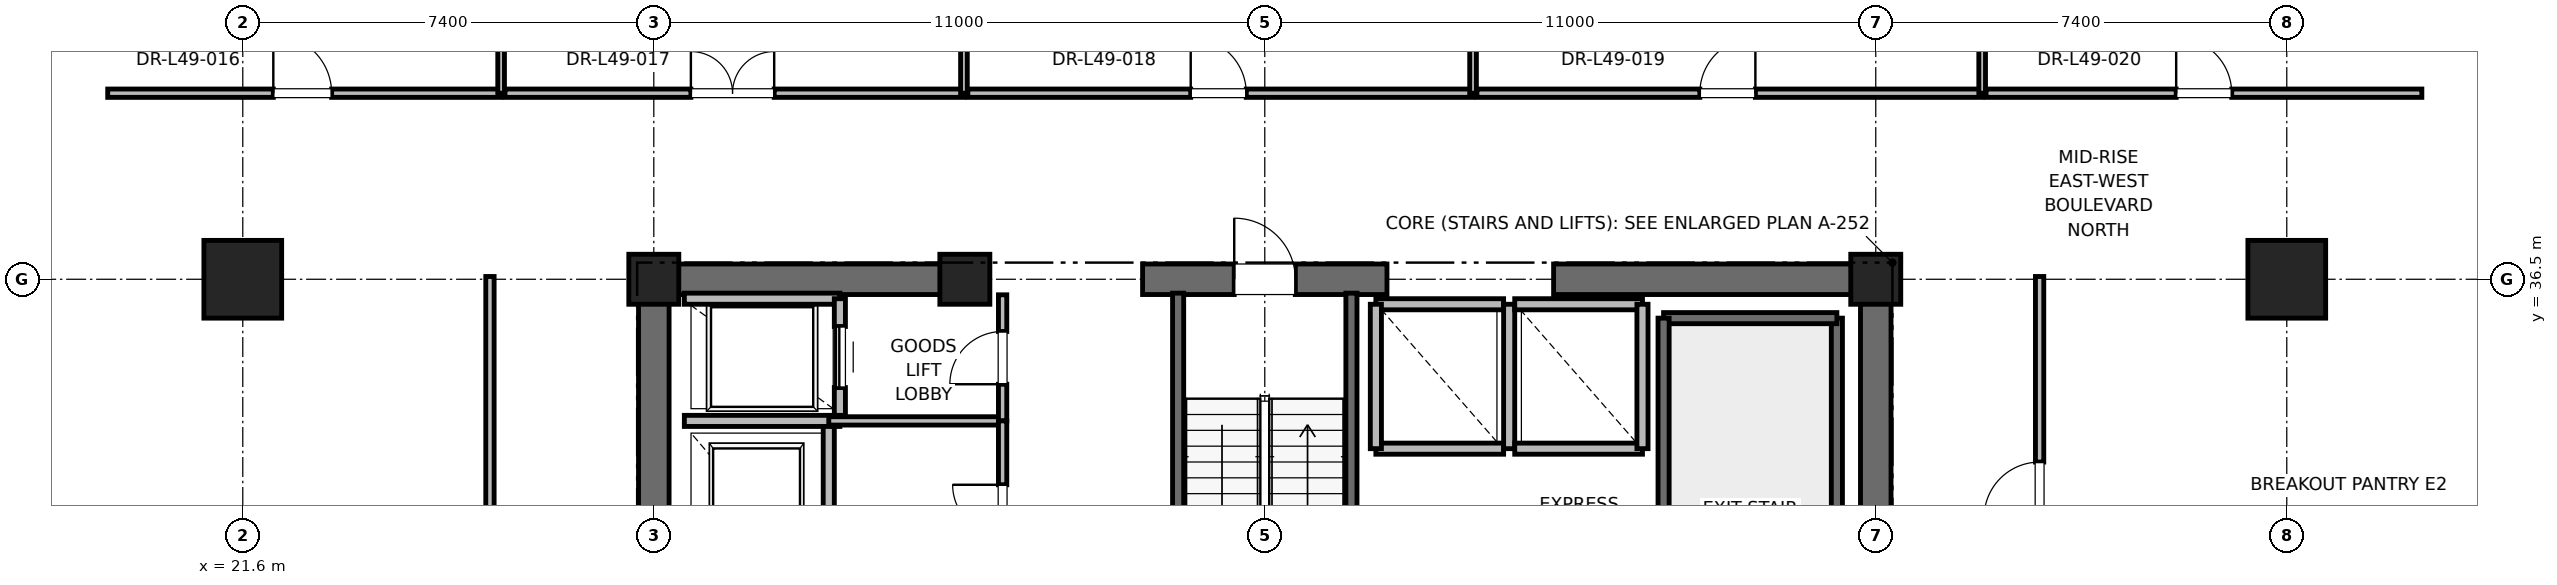
"""IFC4 building model, lengths in metres.
Left out: names, types, materials, properties, quantities, classifications, styles, units other than length and angle.
Written with IfcOpenShell. Run it as: python <this file> out.ifc"""

import sys

from ifc_helpers import new_model, si_unit, direction, frame, frame_2d, origin, origin_2d, place, context, subcontext, project, spatial, rectangle, extrude, element, fill, save


model = new_model("IFC4")
c1 = context("Model", 3, precision=1e-05, world=origin(), true_north=direction((0.0, 1.0)))
c2 = subcontext(c1, "Body", "Model", "MODEL_VIEW")
j1 = project(units=[si_unit("LENGTHUNIT", "METRE"), si_unit("PLANEANGLEUNIT", "RADIAN")], contexts=[c1])
p1 = place(None, origin())
s1 = spatial("IfcSite", under=j1, at=p1, CompositionType="ELEMENT")
p2 = place(p1, origin())
s2 = spatial("IfcBuilding", under=s1, at=p2, CompositionType="ELEMENT")
p3 = place(p2, frame((0.0, 0.0, 213.2)))
s3 = spatial("IfcBuildingStorey", under=s2, at=p3, CompositionType="ELEMENT", Elevation=213.2)
for number, where, z_axis, x_axis in (
    (1, (21.6, 36.5, 0.0), (0.0, 0.0, 1.0), (1.0, 0.0, 0.0)),
    (2, (58.4, 36.5, 0.0), (0.0, 0.0, 1.0), (1.0, 0.0, 0.0)),
):
    element("IfcColumn", number, at=place(p3, frame(where, z_axis=z_axis, x_axis=x_axis)), inside=s3, PredefinedType="COLUMN", context=c2, shape_type="SweptSolid", body=[
        extrude(rectangle(XDim=1.4, YDim=1.4, at=origin_2d()), origin(), (0.0, 0.0, 1.0), 4.0),
    ])
for number, where, z_axis, x_axis in (
    (3, (29.0, 36.5, 0.0), (0.0, 0.0, 1.0), (1.0, 0.0, 0.0)),
    (4, (51.0, 36.5, 0.0), (0.0, 0.0, 1.0), (1.0, 0.0, 0.0)),
    (5, (34.6, 36.5, 0.0), (0.0, 0.0, 1.0), (1.0, 0.0, 0.0)),
):
    element("IfcColumn", number, at=place(p3, frame(where, z_axis=z_axis, x_axis=x_axis)), inside=s3, PredefinedType="PILASTER", context=c2, shape_type="SweptSolid", body=[
        extrude(rectangle(XDim=0.9, YDim=0.9, at=origin_2d()), origin(), (0.0, 0.0, 1.0), 4.0),
    ])
p4 = place(p3, frame((29.0, 36.5, 0.0), z_axis=(0.0, 0.0, 1.0), x_axis=(1.0, 0.0, 0.0)))
e6 = element("IfcWall", 6, at=p4, inside=s3, PredefinedType="SHEAR", context=c2, shape_type="SweptSolid", body=[
    extrude(rectangle(XDim=5.8, YDim=0.55, at=frame_2d((2.9, 0.0))), origin(), (0.0, 0.0, 1.0), 3.775),
])
p5 = place(p3, frame((37.8, 36.5, 0.0), z_axis=(0.0, 0.0, 1.0), x_axis=(1.0, 0.0, 0.0)))
e7 = element("IfcWall", 7, at=p5, inside=s3, PredefinedType="SHEAR", context=c2, shape_type="SweptSolid", body=[
    extrude(rectangle(XDim=4.4, YDim=0.55, at=frame_2d((2.2, 0.0))), origin(), (0.0, 0.0, 1.0), 3.775),
])
p6 = place(p5, frame((1.65, 0.0, 0.0)))
e8 = element("IfcOpeningElement", 8, at=p6, cuts=e7, PredefinedType="OPENING", context=c2, shape_type="SweptSolid", body=[
    extrude(rectangle(XDim=1.1, YDim=2.15, at=frame_2d((0.55, 1.075))), frame((0.0, 0.275, 0.0), z_axis=(0.0, -1.0, 0.0), x_axis=(1.0, 0.0, 0.0)), (0.0, 0.0, 1.0), 0.55),
])
for number, where, z_axis, x_axis in (
    (9, (45.2, 36.5, 0.0), (0.0, 0.0, 1.0), (1.0, 0.0, 0.0)),
    (10, (29.0, 30.7, 0.0), (0.0, 0.0, 1.0), (0.0, 1.0, 0.0)),
):
    element("IfcWall", number, at=place(p3, frame(where, z_axis=z_axis, x_axis=x_axis)), inside=s3, PredefinedType="SHEAR", context=c2, shape_type="SweptSolid", body=[
        extrude(rectangle(XDim=5.8, YDim=0.55, at=frame_2d((2.9, 0.0))), origin(), (0.0, 0.0, 1.0), 3.775),
    ])
p7 = place(p3, frame((51.0, 27.7, 0.0), z_axis=(0.0, 0.0, 1.0), x_axis=(0.0, 1.0, 0.0)))
e11 = element("IfcWall", 11, at=p7, inside=s3, PredefinedType="SHEAR", context=c2, shape_type="SweptSolid", body=[
    extrude(rectangle(XDim=8.8, YDim=0.55, at=frame_2d((4.4, 0.0))), origin(), (0.0, 0.0, 1.0), 3.775),
])
p8 = place(p3, frame((50.3, 27.65, 0.0), z_axis=(0.0, 0.0, 1.0), x_axis=(0.0, 1.0, 0.0)))
e12 = element("IfcWall", 12, at=p8, inside=s3, PredefinedType="SOLIDWALL", context=c2, shape_type="SweptSolid", body=[
    extrude(rectangle(XDim=8.15, YDim=0.2, at=frame_2d((4.075, 0.0))), origin(), (0.0, 0.0, 1.0), 3.775),
])
p9 = place(p3, frame((47.18, 35.8, 0.0), z_axis=(0.0, 0.0, 1.0), x_axis=(1.0, 0.0, 0.0)))
e13 = element("IfcWall", 13, at=p9, inside=s3, PredefinedType="SOLIDWALL", context=c2, shape_type="SweptSolid", body=[
    extrude(rectangle(XDim=3.12, YDim=0.2, at=frame_2d((1.56, 0.0))), origin(), (0.0, 0.0, 1.0), 3.775),
])
p10 = place(p3, frame((47.18, 27.62, 0.0), z_axis=(0.0, 0.0, 1.0), x_axis=(0.0, 1.0, 0.0)))
e14 = element("IfcWall", 14, at=p10, inside=s3, PredefinedType="SOLIDWALL", context=c2, shape_type="SweptSolid", body=[
    extrude(rectangle(XDim=8.18, YDim=0.2, at=frame_2d((4.09, 0.0))), origin(), (0.0, 0.0, 1.0), 3.775),
])
p11 = place(p3, frame((38.44, 27.38, 0.0), z_axis=(0.0, 0.0, 1.0), x_axis=(0.0, 1.0, 0.0)))
e15 = element("IfcWall", 15, at=p11, inside=s3, PredefinedType="SOLIDWALL", context=c2, shape_type="SweptSolid", body=[
    extrude(rectangle(XDim=8.87, YDim=0.2, at=frame_2d((4.435, 0.0))), origin(), (0.0, 0.0, 1.0), 3.775),
])
p12 = place(p3, frame((41.56, 27.68, 0.0), z_axis=(0.0, 0.0, 1.0), x_axis=(0.0, 1.0, 0.0)))
e16 = element("IfcWall", 16, at=p12, inside=s3, PredefinedType="SOLIDWALL", context=c2, shape_type="SweptSolid", body=[
    extrude(rectangle(XDim=8.57, YDim=0.2, at=frame_2d((4.285, 0.0))), origin(), (0.0, 0.0, 1.0), 3.775),
])
p13 = place(p3, frame((29.55, 33.95, 0.0), z_axis=(0.0, 0.0, 1.0), x_axis=(1.0, 0.0, 0.0)))
e17 = element("IfcWall", 17, at=p13, inside=s3, PredefinedType="SOLIDWALL", context=c2, shape_type="SweptSolid", body=[
    extrude(rectangle(XDim=2.8, YDim=0.2, at=frame_2d((1.4, 0.0))), origin(), (0.0, 0.0, 1.0), 3.775),
])
p14 = place(p3, frame((32.15, 30.85, 0.0), z_axis=(0.0, 0.0, 1.0), x_axis=(0.0, 1.0, 0.0)))
e18 = element("IfcWall", 18, at=p14, inside=s3, PredefinedType="SOLIDWALL", context=c2, shape_type="SweptSolid", body=[
    extrude(rectangle(XDim=3.0, YDim=0.2, at=frame_2d((1.5, 0.0))), origin(), (0.0, 0.0, 1.0), 3.775),
])
p15 = place(p3, frame((32.35, 36.15, 0.0), z_axis=(0.0, 0.0, 1.0), x_axis=(-1.0, 0.0, 0.0)))
e19 = element("IfcWall", 19, at=p15, inside=s3, PredefinedType="SOLIDWALL", context=c2, shape_type="SweptSolid", body=[
    extrude(rectangle(XDim=2.8, YDim=0.2, at=frame_2d((1.4, 0.0))), origin(), (0.0, 0.0, 1.0), 3.062),
])
p16 = place(p3, frame((32.35, 34.05, 0.0), z_axis=(0.0, 0.0, 1.0), x_axis=(0.0, 1.0, 0.0)))
e20 = element("IfcWall", 20, at=p16, inside=s3, PredefinedType="SOLIDWALL", context=c2, shape_type="SweptSolid", body=[
    extrude(rectangle(XDim=2.1, YDim=0.2, at=frame_2d((1.05, 0.0))), origin(), (0.0, 0.0, 1.0), 3.775),
])
p17 = place(p16, frame((0.5, 0.0, 0.0)))
e21 = element("IfcOpeningElement", 21, at=p17, cuts=e20, PredefinedType="OPENING", context=c2, shape_type="SweptSolid", body=[
    extrude(rectangle(XDim=1.1, YDim=2.2, at=frame_2d((0.55, 1.1))), frame((0.0, 0.1, 0.0), z_axis=(0.0, -1.0, 0.0), x_axis=(1.0, 0.0, 0.0)), (0.0, 0.0, 1.0), 0.2),
])
p18 = place(p3, frame((42.0, 33.45, 0.0), z_axis=(0.0, 0.0, 1.0), x_axis=(1.0, 0.0, 0.0)))
e22 = element("IfcWall", 22, at=p18, inside=s3, PredefinedType="SOLIDWALL", context=c2, shape_type="SweptSolid", body=[
    extrude(rectangle(XDim=2.3, YDim=0.2, at=frame_2d((1.15, 0.0))), origin(), (0.0, 0.0, 1.0), 3.775),
])
p19 = place(p3, frame((44.3, 36.05, 0.0), z_axis=(0.0, 0.0, 1.0), x_axis=(-1.0, 0.0, 0.0)))
e23 = element("IfcWall", 23, at=p19, inside=s3, PredefinedType="SOLIDWALL", context=c2, shape_type="SweptSolid", body=[
    extrude(rectangle(XDim=2.3, YDim=0.2, at=frame_2d((1.15, 0.0))), origin(), (0.0, 0.0, 1.0), 2.755),
])
for number, where, z_axis, x_axis in (
    (24, (42.0, 36.05, 0.0), (0.0, 0.0, 1.0), (0.0, -1.0, 0.0)),
    (25, (44.4, 33.45, 0.0), (0.0, 0.0, 1.0), (0.0, 1.0, 0.0)),
):
    element("IfcWall", number, at=place(p3, frame(where, z_axis=z_axis, x_axis=x_axis)), inside=s3, PredefinedType="SOLIDWALL", context=c2, shape_type="SweptSolid", body=[
        extrude(rectangle(XDim=2.6, YDim=0.2, at=frame_2d((1.3, 0.0))), origin(), (0.0, 0.0, 1.0), 2.755),
    ])
p20 = place(p3, frame((44.5, 33.45, 0.0), z_axis=(0.0, 0.0, 1.0), x_axis=(1.0, 0.0, 0.0)))
e26 = element("IfcWall", 26, at=p20, inside=s3, PredefinedType="SOLIDWALL", context=c2, shape_type="SweptSolid", body=[
    extrude(rectangle(XDim=2.3, YDim=0.2, at=frame_2d((1.15, 0.0))), origin(), (0.0, 0.0, 1.0), 3.775),
])
p21 = place(p3, frame((46.8, 36.05, 0.0), z_axis=(0.0, 0.0, 1.0), x_axis=(-1.0, 0.0, 0.0)))
e27 = element("IfcWall", 27, at=p21, inside=s3, PredefinedType="SOLIDWALL", context=c2, shape_type="SweptSolid", body=[
    extrude(rectangle(XDim=2.3, YDim=0.2, at=frame_2d((1.15, 0.0))), origin(), (0.0, 0.0, 1.0), 2.755),
])
p22 = place(p3, frame((46.8, 33.45, 0.0), z_axis=(0.0, 0.0, 1.0), x_axis=(0.0, 1.0, 0.0)))
e28 = element("IfcWall", 28, at=p22, inside=s3, PredefinedType="SOLIDWALL", context=c2, shape_type="SweptSolid", body=[
    extrude(rectangle(XDim=2.6, YDim=0.2, at=frame_2d((1.3, 0.0))), origin(), (0.0, 0.0, 1.0), 3.775),
])
p23 = place(p3, frame((32.15, 33.95, 0.0), z_axis=(0.0, 0.0, 1.0), x_axis=(1.0, 0.0, 0.0)))
e29 = element("IfcWall", 29, at=p23, inside=s3, PredefinedType="PARTITIONING", context=c2, shape_type="SweptSolid", body=[
    extrude(rectangle(XDim=3.13, YDim=0.15, at=frame_2d((1.565, 0.0))), origin(), (0.0, 0.0, 1.0), 2.85),
])
p24 = place(p3, frame((35.28, 33.95, 0.0), z_axis=(0.0, 0.0, 1.0), x_axis=(0.0, 1.0, 0.0)))
e30 = element("IfcWall", 30, at=p24, inside=s3, PredefinedType="PARTITIONING", context=c2, shape_type="SweptSolid", body=[
    extrude(rectangle(XDim=2.27, YDim=0.15, at=frame_2d((1.135, 0.0))), origin(), (0.0, 0.0, 1.0), 2.755),
])
p25 = place(p24, frame((0.66, 0.0, 0.0)))
e31 = element("IfcOpeningElement", 31, at=p25, cuts=e30, PredefinedType="OPENING", context=c2, shape_type="SweptSolid", body=[
    extrude(rectangle(XDim=0.95, YDim=2.15, at=frame_2d((0.475, 1.075))), frame((0.0, 0.075, 0.0), z_axis=(0.0, -1.0, 0.0), x_axis=(1.0, 0.0, 0.0)), (0.0, 0.0, 1.0), 0.15),
])
p26 = place(p3, frame((35.28, 30.75, 0.0), z_axis=(0.0, 0.0, 1.0), x_axis=(0.0, 1.0, 0.0)))
e32 = element("IfcWall", 32, at=p26, inside=s3, PredefinedType="PARTITIONING", context=c2, shape_type="SweptSolid", body=[
    extrude(rectangle(XDim=3.2, YDim=0.15, at=frame_2d((1.6, 0.0))), origin(), (0.0, 0.0, 1.0), 2.85),
])
p27 = place(p26, frame((1.15, 0.0, 0.0)))
e33 = element("IfcOpeningElement", 33, at=p27, cuts=e32, PredefinedType="OPENING", context=c2, shape_type="SweptSolid", body=[
    extrude(rectangle(XDim=0.9, YDim=2.1, at=frame_2d((0.45, 1.05))), frame((0.0, 0.075, 0.0), z_axis=(0.0, -1.0, 0.0), x_axis=(1.0, 0.0, 0.0)), (0.0, 0.0, 1.0), 0.15),
])
p28 = place(p3, frame((19.168, 39.85, 0.0), z_axis=(0.0, 0.0, 1.0), x_axis=(1.0, 0.0, 0.0)))
e34 = element("IfcWall", 34, at=p28, inside=s3, PredefinedType="PARTITIONING", context=c2, shape_type="SweptSolid", body=[
    extrude(rectangle(XDim=7.083, YDim=0.15, at=frame_2d((3.542, 0.0))), origin(), (0.0, 0.0, 1.0), 2.85),
])
p29 = place(p28, frame((2.981, 0.0, 0.0)))
e35 = element("IfcOpeningElement", 35, at=p29, cuts=e34, PredefinedType="OPENING", context=c2, shape_type="SweptSolid", body=[
    extrude(rectangle(XDim=1.05, YDim=2.2, at=frame_2d((0.525, 1.1))), frame((0.0, 0.075, 0.0), z_axis=(0.0, -1.0, 0.0), x_axis=(1.0, 0.0, 0.0)), (0.0, 0.0, 1.0), 0.15),
])
p30 = place(p3, frame((26.251, 39.85, 0.0), z_axis=(0.0, 0.0, 1.0), x_axis=(0.0, 1.0, 0.0)))
e36 = element("IfcWall", 36, at=p30, inside=s3, PredefinedType="PARTITIONING", context=c2, shape_type="SweptSolid", body=[
    extrude(rectangle(XDim=9.43, YDim=0.12, at=frame_2d((4.715, 0.0))), origin(), (0.0, 0.0, 1.0), 2.85),
])
p31 = place(p3, frame((26.321, 39.85, 0.0), z_axis=(0.0, 0.0, 1.0), x_axis=(1.0, 0.0, 0.0)))
e37 = element("IfcWall", 37, at=p31, inside=s3, PredefinedType="PARTITIONING", context=c2, shape_type="SweptSolid", body=[
    extrude(rectangle(XDim=8.263, YDim=0.15, at=frame_2d((4.131, 0.0))), origin(), (0.0, 0.0, 1.0), 2.85),
])
p32 = place(p31, frame((3.346, 0.0, 0.0)))
e38 = element("IfcOpeningElement", 38, at=p32, cuts=e37, PredefinedType="OPENING", context=c2, shape_type="SweptSolid", body=[
    extrude(rectangle(XDim=1.5, YDim=2.25, at=frame_2d((0.75, 1.125))), frame((0.0, 0.075, 0.0), z_axis=(0.0, -1.0, 0.0), x_axis=(1.0, 0.0, 0.0)), (0.0, 0.0, 1.0), 0.15),
])
p33 = place(p3, frame((34.584, 39.85, 0.0), z_axis=(0.0, 0.0, 1.0), x_axis=(0.0, 1.0, 0.0)))
e39 = element("IfcWall", 39, at=p33, inside=s3, PredefinedType="PARTITIONING", context=c2, shape_type="SweptSolid", body=[
    extrude(rectangle(XDim=9.43, YDim=0.12, at=frame_2d((4.715, 0.0))), origin(), (0.0, 0.0, 1.0), 2.405),
])
p34 = place(p3, frame((34.654, 39.85, 0.0), z_axis=(0.0, 0.0, 1.0), x_axis=(1.0, 0.0, 0.0)))
e40 = element("IfcWall", 40, at=p34, inside=s3, PredefinedType="PARTITIONING", context=c2, shape_type="SweptSolid", body=[
    extrude(rectangle(XDim=9.096, YDim=0.15, at=frame_2d((4.548, 0.0))), origin(), (0.0, 0.0, 1.0), 2.85),
])
p35 = place(p34, frame((4.013, 0.0, 0.0)))
e41 = element("IfcOpeningElement", 41, at=p35, cuts=e40, PredefinedType="OPENING", context=c2, shape_type="SweptSolid", body=[
    extrude(rectangle(XDim=1.0, YDim=2.15, at=frame_2d((0.5, 1.075))), frame((0.0, 0.075, 0.0), z_axis=(0.0, -1.0, 0.0), x_axis=(1.0, 0.0, 0.0)), (0.0, 0.0, 1.0), 0.15),
])
p36 = place(p3, frame((43.75, 39.85, 0.0), z_axis=(0.0, 0.0, 1.0), x_axis=(0.0, 1.0, 0.0)))
e42 = element("IfcWall", 42, at=p36, inside=s3, PredefinedType="PARTITIONING", context=c2, shape_type="SweptSolid", body=[
    extrude(rectangle(XDim=9.43, YDim=0.12, at=frame_2d((4.715, 0.0))), origin(), (0.0, 0.0, 1.0), 2.405),
])
p37 = place(p3, frame((43.82, 39.85, 0.0), z_axis=(0.0, 0.0, 1.0), x_axis=(1.0, 0.0, 0.0)))
e43 = element("IfcWall", 43, at=p37, inside=s3, PredefinedType="PARTITIONING", context=c2, shape_type="SweptSolid", body=[
    extrude(rectangle(XDim=9.096, YDim=0.15, at=frame_2d((4.548, 0.0))), origin(), (0.0, 0.0, 1.0), 2.85),
])
p38 = place(p37, frame((4.013, 0.0, 0.0)))
e44 = element("IfcOpeningElement", 44, at=p38, cuts=e43, PredefinedType="OPENING", context=c2, shape_type="SweptSolid", body=[
    extrude(rectangle(XDim=1.0, YDim=2.15, at=frame_2d((0.5, 1.075))), frame((0.0, 0.075, 0.0), z_axis=(0.0, -1.0, 0.0), x_axis=(1.0, 0.0, 0.0)), (0.0, 0.0, 1.0), 0.15),
])
p39 = place(p3, frame((52.916, 39.85, 0.0), z_axis=(0.0, 0.0, 1.0), x_axis=(0.0, 1.0, 0.0)))
e45 = element("IfcWall", 45, at=p39, inside=s3, PredefinedType="PARTITIONING", context=c2, shape_type="SweptSolid", body=[
    extrude(rectangle(XDim=9.43, YDim=0.12, at=frame_2d((4.715, 0.0))), origin(), (0.0, 0.0, 1.0), 2.85),
])
p40 = place(p3, frame((52.986, 39.85, 0.0), z_axis=(0.0, 0.0, 1.0), x_axis=(1.0, 0.0, 0.0)))
e46 = element("IfcWall", 46, at=p40, inside=s3, PredefinedType="PARTITIONING", context=c2, shape_type="SweptSolid", body=[
    extrude(rectangle(XDim=7.846, YDim=0.15, at=frame_2d((3.923, 0.0))), origin(), (0.0, 0.0, 1.0), 2.85),
])
p41 = place(p40, frame((3.423, 0.0, 0.0)))
e47 = element("IfcOpeningElement", 47, at=p41, cuts=e46, PredefinedType="OPENING", context=c2, shape_type="SweptSolid", body=[
    extrude(rectangle(XDim=1.0, YDim=2.15, at=frame_2d((0.5, 1.075))), frame((0.0, 0.075, 0.0), z_axis=(0.0, -1.0, 0.0), x_axis=(1.0, 0.0, 0.0)), (0.0, 0.0, 1.0), 0.15),
])
p42 = place(p3, frame((26.05, 26.122, 0.0), z_axis=(0.0, 0.0, 1.0), x_axis=(0.0, 1.0, 0.0)))
e48 = element("IfcWall", 48, at=p42, inside=s3, PredefinedType="PARTITIONING", context=c2, shape_type="SweptSolid", body=[
    extrude(rectangle(XDim=10.428, YDim=0.15, at=frame_2d((5.214, 0.0))), origin(), (0.0, 0.0, 1.0), 2.85),
])
p43 = place(p42, frame((4.639, 0.0, 0.0)))
e49 = element("IfcOpeningElement", 49, at=p43, cuts=e48, PredefinedType="OPENING", context=c2, shape_type="SweptSolid", body=[
    extrude(rectangle(XDim=1.0, YDim=2.15, at=frame_2d((0.5, 1.075))), frame((0.0, 0.075, 0.0), z_axis=(0.0, -1.0, 0.0), x_axis=(1.0, 0.0, 0.0)), (0.0, 0.0, 1.0), 0.15),
])
p44 = place(p3, frame((53.95, 29.018, 0.0), z_axis=(0.0, 0.0, 1.0), x_axis=(0.0, 1.0, 0.0)))
e50 = element("IfcWall", 50, at=p44, inside=s3, PredefinedType="PARTITIONING", context=c2, shape_type="SweptSolid", body=[
    extrude(rectangle(XDim=7.532, YDim=0.15, at=frame_2d((3.766, 0.0))), origin(), (0.0, 0.0, 1.0), 2.85),
])
p45 = place(p44, frame((3.191, 0.0, 0.0)))
e51 = element("IfcOpeningElement", 51, at=p45, cuts=e50, PredefinedType="OPENING", context=c2, shape_type="SweptSolid", body=[
    extrude(rectangle(XDim=1.0, YDim=2.15, at=frame_2d((0.5, 1.075))), frame((0.0, 0.075, 0.0), z_axis=(0.0, -1.0, 0.0), x_axis=(1.0, 0.0, 0.0)), (0.0, 0.0, 1.0), 0.15),
])
p46 = place(p6, origin())
e52 = element("IfcDoor", 52, at=p46, inside=s3, OperationType="SINGLE_SWING_LEFT", PredefinedType="DOOR", context=c2, shape_type="SweptSolid", body=[
    extrude(rectangle(XDim=1.1, YDim=2.15, at=frame_2d((0.55, 1.075))), frame((0.0, 0.025, 0.0), z_axis=(0.0, -1.0, 0.0), x_axis=(1.0, 0.0, 0.0)), (0.0, 0.0, 1.0), 0.05),
])
fill(e8, e52)
p47 = place(p17, origin())
e53 = element("IfcDoor", 53, at=p47, inside=s3, OperationType="SLIDING_TO_RIGHT", PredefinedType="DOOR", context=c2, shape_type="SweptSolid", body=[
    extrude(rectangle(XDim=1.1, YDim=2.2, at=frame_2d((0.55, 1.1))), frame((0.0, 0.025, 0.0), z_axis=(0.0, -1.0, 0.0), x_axis=(1.0, 0.0, 0.0)), (0.0, 0.0, 1.0), 0.05),
])
fill(e21, e53)
p48 = place(p25, origin())
e54 = element("IfcDoor", 54, at=p48, inside=s3, OperationType="SINGLE_SWING_LEFT", PredefinedType="DOOR", context=c2, shape_type="SweptSolid", body=[
    extrude(rectangle(XDim=0.95, YDim=2.15, at=frame_2d((0.475, 1.075))), frame((0.0, 0.025, 0.0), z_axis=(0.0, -1.0, 0.0), x_axis=(1.0, 0.0, 0.0)), (0.0, 0.0, 1.0), 0.05),
])
fill(e31, e54)
p49 = place(p27, origin())
e55 = element("IfcDoor", 55, at=p49, inside=s3, OperationType="SINGLE_SWING_RIGHT", PredefinedType="DOOR", context=c2, shape_type="SweptSolid", body=[
    extrude(rectangle(XDim=0.9, YDim=2.1, at=frame_2d((0.45, 1.05))), frame((0.0, 0.025, 0.0), z_axis=(0.0, -1.0, 0.0), x_axis=(1.0, 0.0, 0.0)), (0.0, 0.0, 1.0), 0.05),
])
fill(e33, e55)
p50 = place(p29, origin())
e56 = element("IfcDoor", 56, at=p50, inside=s3, OperationType="SINGLE_SWING_LEFT", PredefinedType="DOOR", context=c2, shape_type="SweptSolid", body=[
    extrude(rectangle(XDim=1.05, YDim=2.2, at=frame_2d((0.525, 1.1))), frame((0.0, 0.025, 0.0), z_axis=(0.0, -1.0, 0.0), x_axis=(1.0, 0.0, 0.0)), (0.0, 0.0, 1.0), 0.05),
])
fill(e35, e56)
p51 = place(p32, origin())
e57 = element("IfcDoor", 57, at=p51, inside=s3, OperationType="DOUBLE_DOOR_SINGLE_SWING", PredefinedType="DOOR", context=c2, shape_type="SweptSolid", body=[
    extrude(rectangle(XDim=1.5, YDim=2.25, at=frame_2d((0.75, 1.125))), frame((0.0, 0.025, 0.0), z_axis=(0.0, -1.0, 0.0), x_axis=(1.0, 0.0, 0.0)), (0.0, 0.0, 1.0), 0.05),
])
fill(e38, e57)
p52 = place(p35, origin())
e58 = element("IfcDoor", 58, at=p52, inside=s3, OperationType="SINGLE_SWING_LEFT", PredefinedType="DOOR", context=c2, shape_type="SweptSolid", body=[
    extrude(rectangle(XDim=1.0, YDim=2.15, at=frame_2d((0.5, 1.075))), frame((0.0, 0.025, 0.0), z_axis=(0.0, -1.0, 0.0), x_axis=(1.0, 0.0, 0.0)), (0.0, 0.0, 1.0), 0.05),
])
fill(e41, e58)
p53 = place(p38, origin())
e59 = element("IfcDoor", 59, at=p53, inside=s3, OperationType="SINGLE_SWING_RIGHT", PredefinedType="DOOR", context=c2, shape_type="SweptSolid", body=[
    extrude(rectangle(XDim=1.0, YDim=2.15, at=frame_2d((0.5, 1.075))), frame((0.0, 0.025, 0.0), z_axis=(0.0, -1.0, 0.0), x_axis=(1.0, 0.0, 0.0)), (0.0, 0.0, 1.0), 0.05),
])
fill(e44, e59)
p54 = place(p41, origin())
e60 = element("IfcDoor", 60, at=p54, inside=s3, OperationType="SINGLE_SWING_LEFT", PredefinedType="DOOR", context=c2, shape_type="SweptSolid", body=[
    extrude(rectangle(XDim=1.0, YDim=2.15, at=frame_2d((0.5, 1.075))), frame((0.0, 0.025, 0.0), z_axis=(0.0, -1.0, 0.0), x_axis=(1.0, 0.0, 0.0)), (0.0, 0.0, 1.0), 0.05),
])
fill(e47, e60)
p55 = place(p45, origin())
e61 = element("IfcDoor", 61, at=p55, inside=s3, OperationType="SINGLE_SWING_LEFT", PredefinedType="DOOR", context=c2, shape_type="SweptSolid", body=[
    extrude(rectangle(XDim=1.0, YDim=2.15, at=frame_2d((0.5, 1.075))), frame((0.0, 0.025, 0.0), z_axis=(0.0, -1.0, 0.0), x_axis=(1.0, 0.0, 0.0)), (0.0, 0.0, 1.0), 0.05),
])
fill(e51, e61)
save(model, sys.argv[1])
